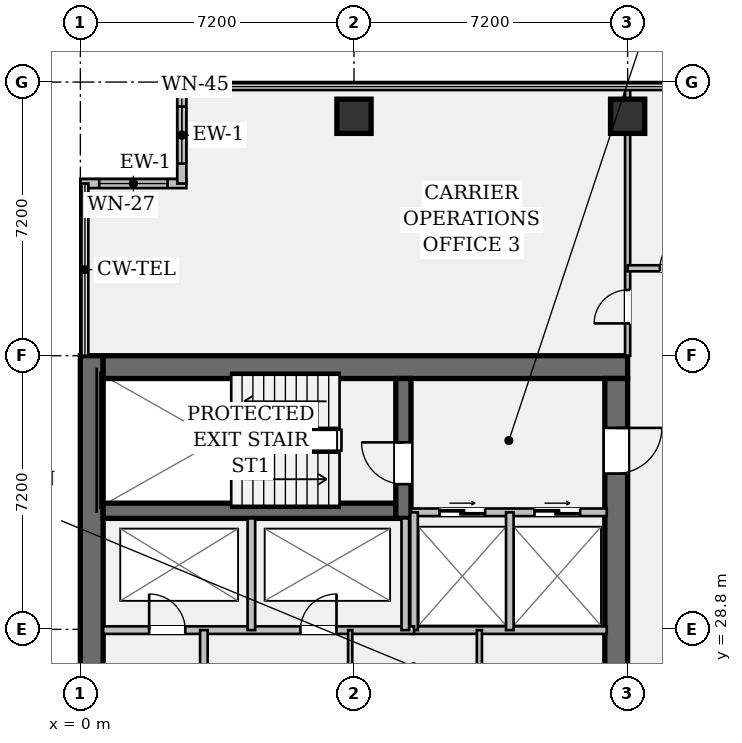
"""IFC4 building model, lengths in metres.
Left out: names, types, materials, properties, quantities, classifications, styles, units other than length and angle.
Written with IfcOpenShell. Run it as: python <this file> out.ifc"""

import sys

from ifc_helpers import new_model, si_unit, direction, frame, frame_2d, origin, origin_2d, place, context, subcontext, project, spatial, rectangle, hollow_rectangle, extrude, element, fill, save


model = new_model("IFC4")
c1 = context("Model", 3, precision=1e-05, world=origin(), true_north=direction((0.0, 1.0)))
c2 = subcontext(c1, "Body", "Model", "MODEL_VIEW")
j1 = project(units=[si_unit("LENGTHUNIT", "METRE"), si_unit("PLANEANGLEUNIT", "RADIAN")], contexts=[c1])
p1 = place(None, origin())
s1 = spatial("IfcSite", under=j1, at=p1, CompositionType="ELEMENT")
p2 = place(p1, origin())
s2 = spatial("IfcBuilding", under=s1, at=p2, CompositionType="ELEMENT")
p3 = place(p2, frame((0.0, 0.0, 136.85)))
s3 = spatial("IfcBuildingStorey", under=s2, at=p3, CompositionType="ELEMENT", Elevation=136.85)
p4 = place(p3, frame((0.3, 7.2, 0.0), z_axis=(0.0, 0.0, 1.0), x_axis=(0.0, 1.0, 0.0)))
e1 = element("IfcWall", 1, at=p4, inside=s3, PredefinedType="SHEAR", context=c2, shape_type="SweptSolid", body=[
    extrude(rectangle(XDim=28.8, YDim=0.6, at=frame_2d((14.4, 0.0))), origin(), (0.0, 0.0, 1.0), 3.58),
])
p5 = place(p3, frame((0.6, 35.7, 0.0), z_axis=(0.0, 0.0, 1.0), x_axis=(1.0, 0.0, 0.0)))
e2 = element("IfcWall", 2, at=p5, inside=s3, PredefinedType="SHEAR", context=c2, shape_type="SweptSolid", body=[
    extrude(rectangle(XDim=13.8, YDim=0.6, at=frame_2d((6.9, 0.0))), origin(), (0.0, 0.0, 1.0), 3.58),
])
p6 = place(p3, frame((14.1, 35.4, 0.0), z_axis=(0.0, 0.0, 1.0), x_axis=(0.0, -1.0, 0.0)))
e3 = element("IfcWall", 3, at=p6, inside=s3, PredefinedType="SHEAR", context=c2, shape_type="SweptSolid", body=[
    extrude(rectangle(XDim=27.6, YDim=0.6, at=frame_2d((13.8, 0.0))), origin(), (0.0, 0.0, 1.0), 3.58),
])
p7 = place(p6, frame((1.3, 0.0, 0.0)))
e4 = element("IfcOpeningElement", 4, at=p7, cuts=e3, PredefinedType="OPENING", context=c2, shape_type="SweptSolid", body=[
    extrude(rectangle(XDim=1.2, YDim=2.15, at=frame_2d((0.6, 1.075))), frame((0.0, 0.312, 0.0), z_axis=(0.0, -1.0, 0.0), x_axis=(1.0, 0.0, 0.0)), (0.0, 0.0, 1.0), 0.624),
])
p8 = place(p6, frame((25.25, 0.0, 0.0)))
e5 = element("IfcOpeningElement", 5, at=p8, cuts=e3, PredefinedType="OPENING", context=c2, shape_type="SweptSolid", body=[
    extrude(rectangle(XDim=1.2, YDim=2.15, at=frame_2d((0.6, 1.075))), frame((0.0, 0.312, 0.0), z_axis=(0.0, -1.0, 0.0), x_axis=(1.0, 0.0, 0.0)), (0.0, 0.0, 1.0), 0.624),
])
p9 = place(p6, frame((14.6, 0.0, 0.0)))
e6 = element("IfcOpeningElement", 6, at=p9, cuts=e3, PredefinedType="OPENING", context=c2, shape_type="SweptSolid", body=[
    extrude(rectangle(XDim=1.6, YDim=2.2, at=frame_2d((0.8, 1.1))), frame((0.0, 0.312, 0.0), z_axis=(0.0, -1.0, 0.0), x_axis=(1.0, 0.0, 0.0)), (0.0, 0.0, 1.0), 0.624),
])
p10 = place(p3, frame((0.6, 31.92, 0.0), z_axis=(0.0, 0.0, 1.0), x_axis=(1.0, 0.0, 0.0)))
e7 = element("IfcWall", 7, at=p10, inside=s3, PredefinedType="SHEAR", context=c2, shape_type="SweptSolid", body=[
    extrude(rectangle(XDim=7.7, YDim=0.4, at=frame_2d((3.85, 0.0))), origin(), (0.0, 0.0, 1.0), 3.58),
])
p11 = place(p3, frame((8.5, 31.72, 0.0), z_axis=(0.0, 0.0, 1.0), x_axis=(0.0, 1.0, 0.0)))
e8 = element("IfcWall", 8, at=p11, inside=s3, PredefinedType="SHEAR", context=c2, shape_type="SweptSolid", body=[
    extrude(rectangle(XDim=3.68, YDim=0.4, at=frame_2d((1.84, 0.0))), origin(), (0.0, 0.0, 1.0), 3.58),
])
p12 = place(p11, frame((0.9, 0.0, 0.0)))
e9 = element("IfcOpeningElement", 9, at=p12, cuts=e8, PredefinedType="OPENING", context=c2, shape_type="SweptSolid", body=[
    extrude(rectangle(XDim=1.1, YDim=2.15, at=frame_2d((0.55, 1.075))), frame((0.0, 0.212, 0.0), z_axis=(0.0, -1.0, 0.0), x_axis=(1.0, 0.0, 0.0)), (0.0, 0.0, 1.0), 0.424),
])
for number, where, z_axis, x_axis in (
    (10, (7.2, 42.3, 0.0), (0.0, 0.0, 1.0), (1.0, 0.0, 0.0)),
    (11, (14.4, 42.3, 0.0), (0.0, 0.0, 1.0), (1.0, 0.0, 0.0)),
):
    element("IfcColumn", number, at=place(p3, frame(where, z_axis=z_axis, x_axis=x_axis)), inside=s3, PredefinedType="COLUMN", context=c2, shape_type="SweptSolid", body=[
        extrude(hollow_rectangle(XDim=0.9, YDim=0.9, WallThickness=0.055, at=origin_2d()), origin(), (0.0, 0.0, 1.0), 3.58),
    ])
p13 = place(p3, frame((0.0, 40.53, 0.0), z_axis=(0.0, 0.0, 1.0), x_axis=(1.0, 0.0, 0.0)))
e12 = element("IfcWall", 12, at=p13, inside=s3, PredefinedType="STANDARD", context=c2, shape_type="SweptSolid", body=[
    extrude(rectangle(XDim=2.79, YDim=0.24, at=frame_2d((1.395, 0.0))), origin(), (0.0, 0.0, 1.0), 3.58),
])
p14 = place(p13, frame((0.495, 0.0, 0.95)))
e13 = element("IfcOpeningElement", 13, at=p14, cuts=e12, PredefinedType="OPENING", context=c2, shape_type="SweptSolid", body=[
    extrude(rectangle(XDim=1.8, YDim=1.35, at=frame_2d((0.9, 0.675))), frame((0.0, 0.132, 0.0), z_axis=(0.0, -1.0, 0.0), x_axis=(1.0, 0.0, 0.0)), (0.0, 0.0, 1.0), 0.264),
])
p15 = place(p3, frame((2.67, 40.53, 0.0), z_axis=(0.0, 0.0, 1.0), x_axis=(0.0, 1.0, 0.0)))
e14 = element("IfcWall", 14, at=p15, inside=s3, PredefinedType="STANDARD", context=c2, shape_type="SweptSolid", body=[
    extrude(rectangle(XDim=2.55, YDim=0.24, at=frame_2d((1.275, 0.0))), origin(), (0.0, 0.0, 1.0), 3.58),
])
p16 = place(p15, frame((0.525, 0.0, 0.95)))
e15 = element("IfcOpeningElement", 15, at=p16, cuts=e14, PredefinedType="OPENING", context=c2, shape_type="SweptSolid", body=[
    extrude(rectangle(XDim=1.5, YDim=1.8, at=frame_2d((0.75, 0.9))), frame((0.0, 0.132, 0.0), z_axis=(0.0, -1.0, 0.0), x_axis=(1.0, 0.0, 0.0)), (0.0, 0.0, 1.0), 0.264),
])
p17 = place(p3, frame((8.7, 31.88, 0.0), z_axis=(0.0, 0.0, 1.0), x_axis=(1.0, 0.0, 0.0)))
e16 = element("IfcWall", 16, at=p17, inside=s3, PredefinedType="PARTITIONING", context=c2, shape_type="SweptSolid", body=[
    extrude(rectangle(XDim=5.15, YDim=0.2, at=frame_2d((2.575, 0.0))), origin(), (0.0, 0.0, 1.0), 3.58),
])
p18 = place(p17, frame((0.75, 0.0, 0.0)))
e17 = element("IfcOpeningElement", 17, at=p18, cuts=e16, PredefinedType="OPENING", context=c2, shape_type="SweptSolid", body=[
    extrude(rectangle(XDim=1.2, YDim=2.2, at=frame_2d((0.6, 1.1))), frame((0.0, 0.112, 0.0), z_axis=(0.0, -1.0, 0.0), x_axis=(1.0, 0.0, 0.0)), (0.0, 0.0, 1.0), 0.224),
])
p19 = place(p17, frame((3.25, 0.0, 0.0)))
e18 = element("IfcOpeningElement", 18, at=p19, cuts=e16, PredefinedType="OPENING", context=c2, shape_type="SweptSolid", body=[
    extrude(rectangle(XDim=1.2, YDim=2.2, at=frame_2d((0.6, 1.1))), frame((0.0, 0.112, 0.0), z_axis=(0.0, -1.0, 0.0), x_axis=(1.0, 0.0, 0.0)), (0.0, 0.0, 1.0), 0.224),
])
p20 = place(p3, frame((8.7, 28.78, 0.0), z_axis=(0.0, 0.0, 1.0), x_axis=(1.0, 0.0, 0.0)))
e19 = element("IfcWall", 19, at=p20, inside=s3, PredefinedType="PARTITIONING", context=c2, shape_type="SweptSolid", body=[
    extrude(rectangle(XDim=5.15, YDim=0.2, at=frame_2d((2.575, 0.0))), origin(), (0.0, 0.0, 1.0), 3.58),
])
for number, where, z_axis, x_axis in (
    (20, (8.78, 28.78, 0.0), (0.0, 0.0, 1.0), (0.0, 1.0, 0.0)),
    (21, (11.3, 28.78, 0.0), (0.0, 0.0, 1.0), (0.0, 1.0, 0.0)),
):
    element("IfcWall", number, at=place(p3, frame(where, z_axis=z_axis, x_axis=x_axis)), inside=s3, PredefinedType="PARTITIONING", context=c2, shape_type="SweptSolid", body=[
        extrude(rectangle(XDim=3.1, YDim=0.2, at=frame_2d((1.55, 0.0))), origin(), (0.0, 0.0, 1.0), 3.58),
    ])
p21 = place(p3, frame((0.6, 28.78, 0.0), z_axis=(0.0, 0.0, 1.0), x_axis=(1.0, 0.0, 0.0)))
e22 = element("IfcWall", 22, at=p21, inside=s3, PredefinedType="PARTITIONING", context=c2, shape_type="SweptSolid", body=[
    extrude(rectangle(XDim=8.18, YDim=0.2, at=frame_2d((4.09, 0.0))), origin(), (0.0, 0.0, 1.0), 3.58),
])
p22 = place(p21, frame((1.21, 0.0, 0.0)))
e23 = element("IfcOpeningElement", 23, at=p22, cuts=e22, PredefinedType="OPENING", context=c2, shape_type="SweptSolid", body=[
    extrude(rectangle(XDim=0.95, YDim=2.15, at=frame_2d((0.475, 1.075))), frame((0.0, 0.112, 0.0), z_axis=(0.0, -1.0, 0.0), x_axis=(1.0, 0.0, 0.0)), (0.0, 0.0, 1.0), 0.224),
])
p23 = place(p21, frame((5.19, 0.0, 0.0)))
e24 = element("IfcOpeningElement", 24, at=p23, cuts=e22, PredefinedType="OPENING", context=c2, shape_type="SweptSolid", body=[
    extrude(rectangle(XDim=0.95, YDim=2.15, at=frame_2d((0.475, 1.075))), frame((0.0, 0.112, 0.0), z_axis=(0.0, -1.0, 0.0), x_axis=(1.0, 0.0, 0.0)), (0.0, 0.0, 1.0), 0.224),
])
for number, where, z_axis, x_axis in (
    (25, (4.5, 28.78, 0.0), (0.0, 0.0, 1.0), (0.0, 1.0, 0.0)),
    (26, (8.55, 28.78, 0.0), (0.0, 0.0, 1.0), (0.0, 1.0, 0.0)),
):
    element("IfcWall", number, at=place(p3, frame(where, z_axis=z_axis, x_axis=x_axis)), inside=s3, PredefinedType="PARTITIONING", context=c2, shape_type="SweptSolid", body=[
        extrude(rectangle(XDim=2.94, YDim=0.2, at=frame_2d((1.47, 0.0))), origin(), (0.0, 0.0, 1.0), 3.58),
    ])
p24 = place(p3, frame((3.25, 15.7, 0.0), z_axis=(0.0, 0.0, 1.0), x_axis=(0.0, 1.0, 0.0)))
e27 = element("IfcWall", 27, at=p24, inside=s3, PredefinedType="PARTITIONING", context=c2, shape_type="SweptSolid", body=[
    extrude(rectangle(XDim=13.08, YDim=0.2, at=frame_2d((6.54, 0.0))), origin(), (0.0, 0.0, 1.0), 3.58),
])
p25 = place(p3, frame((7.1, 22.2, 0.0), z_axis=(0.0, 0.0, 1.0), x_axis=(0.0, 1.0, 0.0)))
e28 = element("IfcWall", 28, at=p25, inside=s3, PredefinedType="PARTITIONING", context=c2, shape_type="SweptSolid", body=[
    extrude(rectangle(XDim=6.58, YDim=0.11, at=frame_2d((3.29, 0.0))), origin(), (0.0, 0.0, 1.0), 3.58),
])
p26 = place(p25, frame((4.1, 0.0, 0.0)))
e29 = element("IfcOpeningElement", 29, at=p26, cuts=e28, PredefinedType="OPENING", context=c2, shape_type="SweptSolid", body=[
    extrude(rectangle(XDim=0.9, YDim=2.15, at=frame_2d((0.45, 1.075))), frame((0.0, 0.067, 0.0), z_axis=(0.0, -1.0, 0.0), x_axis=(1.0, 0.0, 0.0)), (0.0, 0.0, 1.0), 0.134),
])
p27 = place(p3, frame((10.5, 25.0, 0.0), z_axis=(0.0, 0.0, 1.0), x_axis=(0.0, 1.0, 0.0)))
e30 = element("IfcWall", 30, at=p27, inside=s3, PredefinedType="PARTITIONING", context=c2, shape_type="SweptSolid", body=[
    extrude(rectangle(XDim=3.78, YDim=0.135, at=frame_2d((1.89, 0.0))), origin(), (0.0, 0.0, 1.0), 3.58),
])
p28 = place(p27, frame((1.3, 0.0, 0.0)))
e31 = element("IfcOpeningElement", 31, at=p28, cuts=e30, PredefinedType="OPENING", context=c2, shape_type="SweptSolid", body=[
    extrude(rectangle(XDim=0.9, YDim=2.15, at=frame_2d((0.45, 1.075))), frame((0.0, 0.08, 0.0), z_axis=(0.0, -1.0, 0.0), x_axis=(1.0, 0.0, 0.0)), (0.0, 0.0, 1.0), 0.159),
])
p29 = place(p3, frame((14.4, 36.0, 0.0), z_axis=(0.0, 0.0, 1.0), x_axis=(0.0, 1.0, 0.0)))
e32 = element("IfcWall", 32, at=p29, inside=s3, PredefinedType="PARTITIONING", context=c2, shape_type="SweptSolid", body=[
    extrude(rectangle(XDim=7.08, YDim=0.135, at=frame_2d((3.54, 0.0))), origin(), (0.0, 0.0, 1.0), 2.869),
])
p30 = place(p29, frame((0.85, 0.0, 0.0)))
e33 = element("IfcOpeningElement", 33, at=p30, cuts=e32, PredefinedType="OPENING", context=c2, shape_type="SweptSolid", body=[
    extrude(rectangle(XDim=0.88, YDim=2.15, at=frame_2d((0.44, 1.075))), frame((0.0, 0.08, 0.0), z_axis=(0.0, -1.0, 0.0), x_axis=(1.0, 0.0, 0.0)), (0.0, 0.0, 1.0), 0.159),
])
p31 = place(p3, frame((14.4, 38.3, 0.0), z_axis=(0.0, 0.0, 1.0), x_axis=(1.0, 0.0, 0.0)))
e34 = element("IfcWall", 34, at=p31, inside=s3, PredefinedType="PARTITIONING", context=c2, shape_type="SweptSolid", body=[
    extrude(rectangle(XDim=2.95, YDim=0.16, at=frame_2d((1.475, 0.0))), origin(), (0.0, 0.0, 1.0), 2.869),
])
p32 = place(p31, frame((0.85, 0.0, 0.0)))
e35 = element("IfcOpeningElement", 35, at=p32, cuts=e34, PredefinedType="OPENING", context=c2, shape_type="SweptSolid", body=[
    extrude(rectangle(XDim=0.88, YDim=2.15, at=frame_2d((0.44, 1.075))), frame((0.0, 0.092, 0.0), z_axis=(0.0, -1.0, 0.0), x_axis=(1.0, 0.0, 0.0)), (0.0, 0.0, 1.0), 0.184),
])
p33 = place(p14, origin())
e36 = element("IfcWindow", 36, at=p33, inside=s3, PartitioningType="SINGLE_PANEL", PredefinedType="WINDOW", context=c2, shape_type="SweptSolid", body=[
    extrude(rectangle(XDim=1.8, YDim=1.35, at=frame_2d((0.9, 0.675))), frame((0.0, 0.03, 0.0), z_axis=(0.0, -1.0, 0.0), x_axis=(1.0, 0.0, 0.0)), (0.0, 0.0, 1.0), 0.06),
])
fill(e13, e36)
p34 = place(p16, origin())
e37 = element("IfcWindow", 37, at=p34, inside=s3, PartitioningType="SINGLE_PANEL", PredefinedType="WINDOW", context=c2, shape_type="SweptSolid", body=[
    extrude(rectangle(XDim=1.5, YDim=1.8, at=frame_2d((0.75, 0.9))), frame((0.0, 0.03, 0.0), z_axis=(0.0, -1.0, 0.0), x_axis=(1.0, 0.0, 0.0)), (0.0, 0.0, 1.0), 0.06),
])
fill(e15, e37)
p35 = place(p12, origin())
e38 = element("IfcDoor", 38, at=p35, inside=s3, OperationType="SINGLE_SWING_RIGHT", PredefinedType="DOOR", context=c2, shape_type="SweptSolid", body=[
    extrude(rectangle(XDim=1.1, YDim=2.15, at=frame_2d((0.55, 1.075))), frame((0.0, 0.025, 0.0), z_axis=(0.0, -1.0, 0.0), x_axis=(1.0, 0.0, 0.0)), (0.0, 0.0, 1.0), 0.05),
])
fill(e9, e38)
p36 = place(p7, origin())
e39 = element("IfcDoor", 39, at=p36, inside=s3, OperationType="SINGLE_SWING_LEFT", PredefinedType="DOOR", context=c2, shape_type="SweptSolid", body=[
    extrude(rectangle(XDim=1.2, YDim=2.15, at=frame_2d((0.6, 1.075))), frame((0.0, 0.025, 0.0), z_axis=(0.0, -1.0, 0.0), x_axis=(1.0, 0.0, 0.0)), (0.0, 0.0, 1.0), 0.05),
])
fill(e4, e39)
p37 = place(p18, origin())
e40 = element("IfcDoor", 40, at=p37, inside=s3, OperationType="DOUBLE_DOOR_SLIDING", PredefinedType="DOOR", context=c2, shape_type="SweptSolid", body=[
    extrude(rectangle(XDim=1.2, YDim=2.2, at=frame_2d((0.6, 1.1))), frame((0.0, 0.025, 0.0), z_axis=(0.0, -1.0, 0.0), x_axis=(1.0, 0.0, 0.0)), (0.0, 0.0, 1.0), 0.05),
])
fill(e17, e40)
p38 = place(p19, origin())
e41 = element("IfcDoor", 41, at=p38, inside=s3, OperationType="DOUBLE_DOOR_SLIDING", PredefinedType="DOOR", context=c2, shape_type="SweptSolid", body=[
    extrude(rectangle(XDim=1.2, YDim=2.2, at=frame_2d((0.6, 1.1))), frame((0.0, 0.025, 0.0), z_axis=(0.0, -1.0, 0.0), x_axis=(1.0, 0.0, 0.0)), (0.0, 0.0, 1.0), 0.05),
])
fill(e18, e41)
p39 = place(p22, origin())
e42 = element("IfcDoor", 42, at=p39, inside=s3, OperationType="SINGLE_SWING_LEFT", PredefinedType="DOOR", context=c2, shape_type="SweptSolid", body=[
    extrude(rectangle(XDim=0.95, YDim=2.15, at=frame_2d((0.475, 1.075))), frame((0.0, 0.025, 0.0), z_axis=(0.0, -1.0, 0.0), x_axis=(1.0, 0.0, 0.0)), (0.0, 0.0, 1.0), 0.05),
])
fill(e23, e42)
p40 = place(p23, origin())
e43 = element("IfcDoor", 43, at=p40, inside=s3, OperationType="SINGLE_SWING_RIGHT", PredefinedType="DOOR", context=c2, shape_type="SweptSolid", body=[
    extrude(rectangle(XDim=0.95, YDim=2.15, at=frame_2d((0.475, 1.075))), frame((0.0, 0.025, 0.0), z_axis=(0.0, -1.0, 0.0), x_axis=(1.0, 0.0, 0.0)), (0.0, 0.0, 1.0), 0.05),
])
fill(e24, e43)
p41 = place(p30, origin())
e44 = element("IfcDoor", 44, at=p41, inside=s3, OperationType="SINGLE_SWING_LEFT", PredefinedType="DOOR", context=c2, shape_type="SweptSolid", body=[
    extrude(rectangle(XDim=0.88, YDim=2.15, at=frame_2d((0.44, 1.075))), frame((0.0, 0.025, 0.0), z_axis=(0.0, -1.0, 0.0), x_axis=(1.0, 0.0, 0.0)), (0.0, 0.0, 1.0), 0.05),
])
fill(e33, e44)
p42 = place(p32, origin())
e45 = element("IfcDoor", 45, at=p42, inside=s3, OperationType="SINGLE_SWING_RIGHT", PredefinedType="DOOR", context=c2, shape_type="SweptSolid", body=[
    extrude(rectangle(XDim=0.88, YDim=2.15, at=frame_2d((0.44, 1.075))), frame((0.0, 0.025, 0.0), z_axis=(0.0, -1.0, 0.0), x_axis=(1.0, 0.0, 0.0)), (0.0, 0.0, 1.0), 0.05),
])
fill(e35, e45)
save(model, sys.argv[1])
